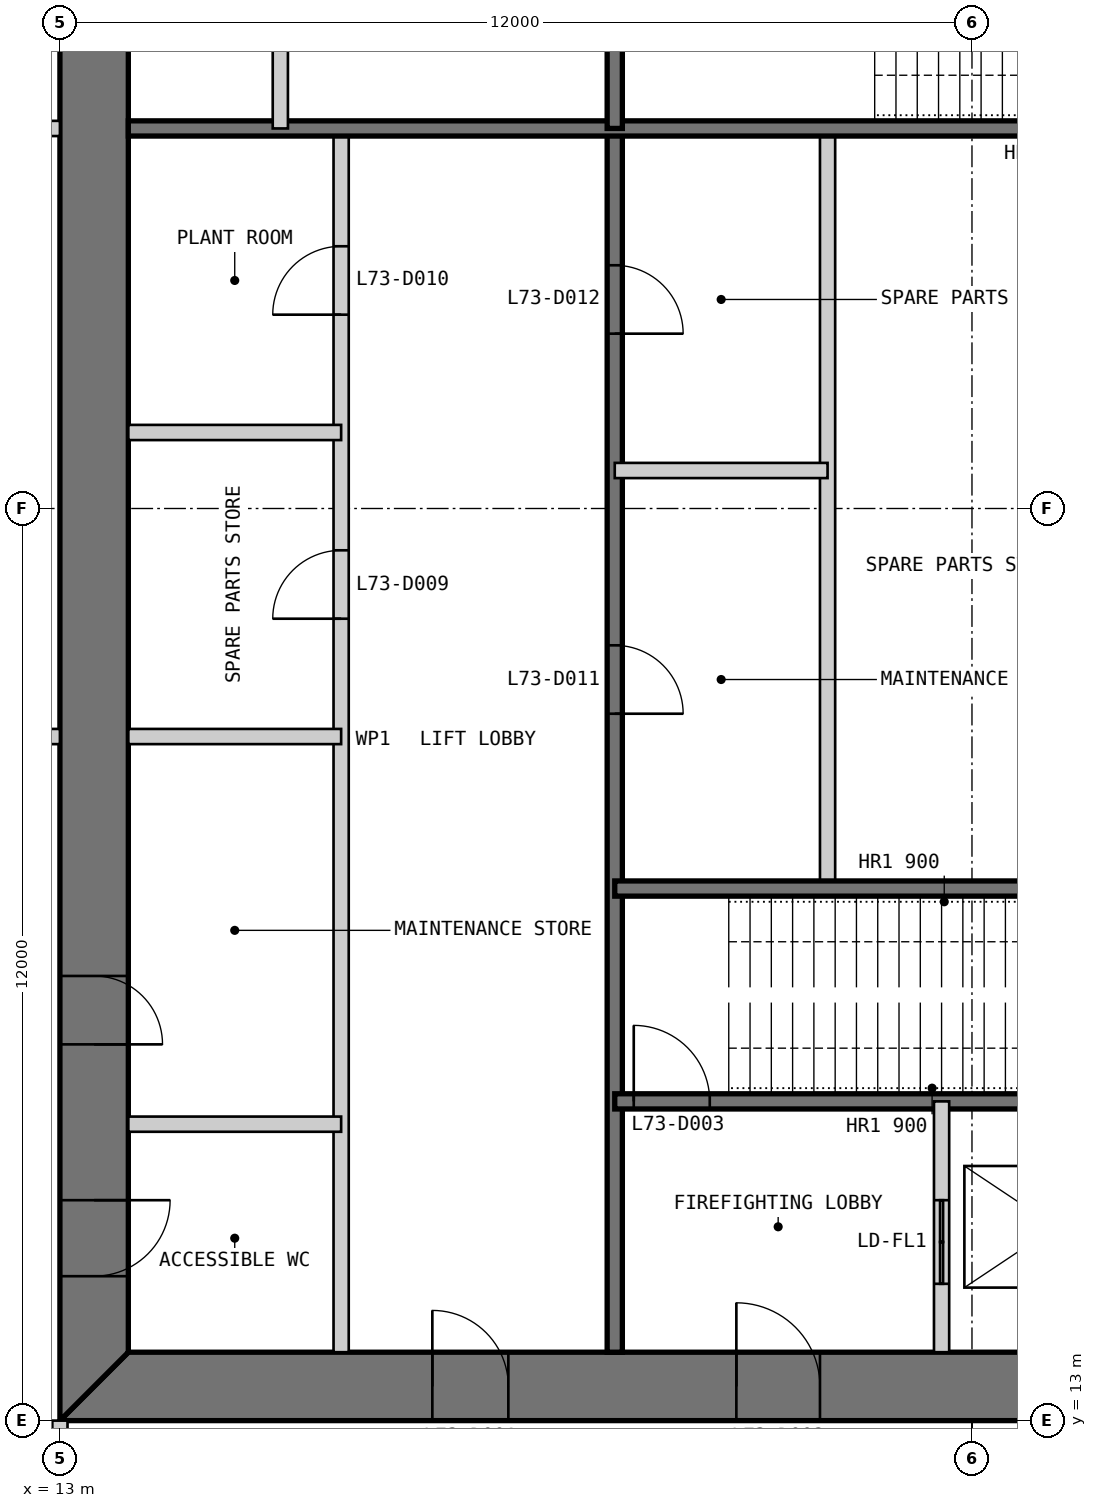
"""IFC4 building model, lengths in metres.
Left out: names, types, materials, properties, quantities, classifications, styles, units other than length and angle.
Written with IfcOpenShell. Run it as: python <this file> out.ifc"""

import sys

from ifc_helpers import new_model, si_unit, direction, frame, frame_2d, origin, place, context, subcontext, project, spatial, polyline, rectangle, outline, extrude, element, fill, save


model = new_model("IFC4")
c1 = context("Model", 3, precision=1e-05, world=origin(), true_north=direction((0.0, 1.0)))
c2 = subcontext(c1, "Body", "Model", "MODEL_VIEW")
j1 = project(units=[si_unit("LENGTHUNIT", "METRE"), si_unit("PLANEANGLEUNIT", "RADIAN")], contexts=[c1])
p1 = place(None, origin())
s1 = spatial("IfcSite", under=j1, at=p1, CompositionType="ELEMENT")
p2 = place(p1, origin())
s2 = spatial("IfcBuilding", under=s1, at=p2, CompositionType="ELEMENT")
p3 = place(p2, frame((0.0, 0.0, 301.8)))
s3 = spatial("IfcBuildingStorey", under=s2, at=p3, CompositionType="ELEMENT", Elevation=301.8)
p4 = place(p3, frame((13.0, 13.45, 0.0), z_axis=(0.0, 0.0, 1.0), x_axis=(1.0, 0.0, 0.0)))
e1 = element("IfcWall", 1, at=p4, inside=s3, PredefinedType="SHEAR", context=c2, shape_type="SweptSolid", body=[
    extrude(outline(polyline([(0.0, -0.45), (24.0, -0.45), (23.1, 0.45), (0.9, 0.45), (0.0, -0.45)])), origin(), (0.0, 0.0, 1.0), 6.0),
])
p5 = place(p4, frame((4.9, 0.0, 0.0)))
e2 = element("IfcOpeningElement", 2, at=p5, cuts=e1, PredefinedType="OPENING", context=c2, shape_type="SweptSolid", body=[
    extrude(rectangle(XDim=1.0, YDim=2.2, at=frame_2d((0.5, 1.1))), frame((0.0, 0.46, 0.0), z_axis=(0.0, -1.0, 0.0), x_axis=(1.0, 0.0, 0.0)), (0.0, 0.0, 1.0), 0.92),
])
p6 = place(p4, frame((8.9, 0.0, 0.0)))
e3 = element("IfcOpeningElement", 3, at=p6, cuts=e1, PredefinedType="OPENING", context=c2, shape_type="SweptSolid", body=[
    extrude(rectangle(XDim=1.1, YDim=2.2, at=frame_2d((0.55, 1.1))), frame((0.0, 0.46, 0.0), z_axis=(0.0, -1.0, 0.0), x_axis=(1.0, 0.0, 0.0)), (0.0, 0.0, 1.0), 0.92),
])
p7 = place(p4, frame((15.05, 0.0, 0.0)))
e4 = element("IfcOpeningElement", 4, at=p7, cuts=e1, PredefinedType="OPENING", context=c2, shape_type="SweptSolid", body=[
    extrude(rectangle(XDim=0.9, YDim=2.2, at=frame_2d((0.45, 1.1))), frame((0.0, 0.46, 0.0), z_axis=(0.0, -1.0, 0.0), x_axis=(1.0, 0.0, 0.0)), (0.0, 0.0, 1.0), 0.92),
])
p8 = place(p4, frame((17.9, 0.0, 0.0)))
e5 = element("IfcOpeningElement", 5, at=p8, cuts=e1, PredefinedType="OPENING", context=c2, shape_type="SweptSolid", body=[
    extrude(rectangle(XDim=1.0, YDim=2.2, at=frame_2d((0.5, 1.1))), frame((0.0, 0.46, 0.0), z_axis=(0.0, -1.0, 0.0), x_axis=(1.0, 0.0, 0.0)), (0.0, 0.0, 1.0), 0.92),
])
p9 = place(p4, frame((21.4, 0.0, 0.0)))
e6 = element("IfcOpeningElement", 6, at=p9, cuts=e1, PredefinedType="OPENING", context=c2, shape_type="SweptSolid", body=[
    extrude(rectangle(XDim=1.0, YDim=2.2, at=frame_2d((0.5, 1.1))), frame((0.0, 0.46, 0.0), z_axis=(0.0, -1.0, 0.0), x_axis=(1.0, 0.0, 0.0)), (0.0, 0.0, 1.0), 0.92),
])
p10 = place(p3, frame((13.45, 36.1, 0.0), z_axis=(0.0, 0.0, 1.0), x_axis=(0.0, -1.0, 0.0)))
e7 = element("IfcWall", 7, at=p10, inside=s3, PredefinedType="SHEAR", context=c2, shape_type="SweptSolid", body=[
    extrude(outline(polyline([(-0.9, -0.45), (23.1, -0.45), (22.2, 0.45), (0.0, 0.45), (-0.9, -0.45)])), origin(), (0.0, 0.0, 1.0), 6.0),
])
p11 = place(p10, frame((20.2, 0.0, 0.0)))
e8 = element("IfcOpeningElement", 8, at=p11, cuts=e7, PredefinedType="OPENING", context=c2, shape_type="SweptSolid", body=[
    extrude(rectangle(XDim=1.0, YDim=2.2, at=frame_2d((0.5, 1.1))), frame((0.0, 0.46, 0.0), z_axis=(0.0, -1.0, 0.0), x_axis=(1.0, 0.0, 0.0)), (0.0, 0.0, 1.0), 0.92),
])
p12 = place(p10, frame((17.25, 0.0, 0.0)))
e9 = element("IfcOpeningElement", 9, at=p12, cuts=e7, PredefinedType="OPENING", context=c2, shape_type="SweptSolid", body=[
    extrude(rectangle(XDim=0.9, YDim=2.2, at=frame_2d((0.45, 1.1))), frame((0.0, 0.46, 0.0), z_axis=(0.0, -1.0, 0.0), x_axis=(1.0, 0.0, 0.0)), (0.0, 0.0, 1.0), 0.92),
])
p13 = place(p3, frame((16.7, 13.9, 0.0), z_axis=(0.0, 0.0, 1.0), x_axis=(0.0, 1.0, 0.0)))
e10 = element("IfcWall", 10, at=p13, inside=s3, PredefinedType="PARTITIONING", context=c2, shape_type="SweptSolid", body=[
    extrude(rectangle(XDim=16.1, YDim=0.2, at=frame_2d((8.05, 0.0))), origin(), (0.0, 0.0, 1.0), 5.8),
])
p14 = place(p13, frame((9.65, 0.0, 0.0)))
e11 = element("IfcOpeningElement", 11, at=p14, cuts=e10, PredefinedType="OPENING", context=c2, shape_type="SweptSolid", body=[
    extrude(rectangle(XDim=0.9, YDim=2.2, at=frame_2d((0.45, 1.1))), frame((0.0, 0.11, 0.0), z_axis=(0.0, -1.0, 0.0), x_axis=(1.0, 0.0, 0.0)), (0.0, 0.0, 1.0), 0.22),
])
p15 = place(p13, frame((13.65, 0.0, 0.0)))
e12 = element("IfcOpeningElement", 12, at=p15, cuts=e10, PredefinedType="OPENING", context=c2, shape_type="SweptSolid", body=[
    extrude(rectangle(XDim=0.9, YDim=2.2, at=frame_2d((0.45, 1.1))), frame((0.0, 0.11, 0.0), z_axis=(0.0, -1.0, 0.0), x_axis=(1.0, 0.0, 0.0)), (0.0, 0.0, 1.0), 0.22),
])
p16 = place(p3, frame((20.3, 13.9, 0.0), z_axis=(0.0, 0.0, 1.0), x_axis=(0.0, 1.0, 0.0)))
e13 = element("IfcWall", 13, at=p16, inside=s3, PredefinedType="SOLIDWALL", context=c2, shape_type="SweptSolid", body=[
    extrude(rectangle(XDim=16.1, YDim=0.2, at=frame_2d((8.05, 0.0))), origin(), (0.0, 0.0, 1.0), 5.8),
])
p17 = place(p16, frame((8.4, 0.0, 0.0)))
e14 = element("IfcOpeningElement", 14, at=p17, cuts=e13, PredefinedType="OPENING", context=c2, shape_type="SweptSolid", body=[
    extrude(rectangle(XDim=0.9, YDim=2.2, at=frame_2d((0.45, 1.1))), frame((0.0, 0.11, 0.0), z_axis=(0.0, -1.0, 0.0), x_axis=(1.0, 0.0, 0.0)), (0.0, 0.0, 1.0), 0.22),
])
p18 = place(p16, frame((13.4, 0.0, 0.0)))
e15 = element("IfcOpeningElement", 15, at=p18, cuts=e13, PredefinedType="OPENING", context=c2, shape_type="SweptSolid", body=[
    extrude(rectangle(XDim=0.9, YDim=2.2, at=frame_2d((0.45, 1.1))), frame((0.0, 0.11, 0.0), z_axis=(0.0, -1.0, 0.0), x_axis=(1.0, 0.0, 0.0)), (0.0, 0.0, 1.0), 0.22),
])
p19 = place(p3, frame((23.1, 20.0, 0.0), z_axis=(0.0, 0.0, 1.0), x_axis=(0.0, 1.0, 0.0)))
e16 = element("IfcWall", 16, at=p19, inside=s3, PredefinedType="PARTITIONING", context=c2, shape_type="SweptSolid", body=[
    extrude(rectangle(XDim=10.0, YDim=0.2, at=frame_2d((5.0, 0.0))), origin(), (0.0, 0.0, 1.0), 5.8),
])
p20 = place(p3, frame((20.3, 17.2, 0.0), z_axis=(0.0, 0.0, 1.0), x_axis=(1.0, 0.0, 0.0)))
e17 = element("IfcWall", 17, at=p20, inside=s3, PredefinedType="SOLIDWALL", context=c2, shape_type="SweptSolid", body=[
    extrude(rectangle(XDim=9.4, YDim=0.2, at=frame_2d((4.7, 0.0))), origin(), (0.0, 0.0, 1.0), 5.8),
])
p21 = place(p20, frame((0.25, 0.0, 0.0)))
e18 = element("IfcOpeningElement", 18, at=p21, cuts=e17, PredefinedType="OPENING", context=c2, shape_type="SweptSolid", body=[
    extrude(rectangle(XDim=1.0, YDim=2.2, at=frame_2d((0.5, 1.1))), frame((0.0, 0.11, 0.0), z_axis=(0.0, -1.0, 0.0), x_axis=(1.0, 0.0, 0.0)), (0.0, 0.0, 1.0), 0.22),
])
p22 = place(p3, frame((20.3, 20.0, 0.0), z_axis=(0.0, 0.0, 1.0), x_axis=(1.0, 0.0, 0.0)))
e19 = element("IfcWall", 19, at=p22, inside=s3, PredefinedType="SOLIDWALL", context=c2, shape_type="SweptSolid", body=[
    extrude(rectangle(XDim=15.8, YDim=0.2, at=frame_2d((7.9, 0.0))), origin(), (0.0, 0.0, 1.0), 5.8),
])
p23 = place(p3, frame((24.6, 13.9, 0.0), z_axis=(0.0, 0.0, 1.0), x_axis=(0.0, 1.0, 0.0)))
e20 = element("IfcWall", 20, at=p23, inside=s3, PredefinedType="PARTITIONING", context=c2, shape_type="SweptSolid", body=[
    extrude(rectangle(XDim=3.3, YDim=0.2, at=frame_2d((1.65, 0.0))), origin(), (0.0, 0.0, 1.0), 5.8),
])
p24 = place(p23, frame((0.9, 0.0, 0.0)))
e21 = element("IfcOpeningElement", 21, at=p24, cuts=e20, PredefinedType="OPENING", context=c2, shape_type="SweptSolid", body=[
    extrude(rectangle(XDim=1.1, YDim=2.2, at=frame_2d((0.55, 1.1))), frame((0.0, 0.11, 0.0), z_axis=(0.0, -1.0, 0.0), x_axis=(1.0, 0.0, 0.0)), (0.0, 0.0, 1.0), 0.22),
])
for number, where, z_axis, x_axis in (
    (22, (13.9, 16.9, 0.0), (0.0, 0.0, 1.0), (1.0, 0.0, 0.0)),
    (23, (13.9, 22.0, 0.0), (0.0, 0.0, 1.0), (1.0, 0.0, 0.0)),
    (24, (13.9, 26.0, 0.0), (0.0, 0.0, 1.0), (1.0, 0.0, 0.0)),
    (25, (20.3, 25.5, 0.0), (0.0, 0.0, 1.0), (1.0, 0.0, 0.0)),
):
    element("IfcWall", number, at=place(p3, frame(where, z_axis=z_axis, x_axis=x_axis)), inside=s3, PredefinedType="PARTITIONING", context=c2, shape_type="SweptSolid", body=[
        extrude(rectangle(XDim=2.8, YDim=0.2, at=frame_2d((1.4, 0.0))), origin(), (0.0, 0.0, 1.0), 5.8),
    ])
p25 = place(p3, frame((29.7, 30.0, 0.0), z_axis=(0.0, 0.0, 1.0), x_axis=(-1.0, 0.0, 0.0)))
e26 = element("IfcWall", 26, at=p25, inside=s3, PredefinedType="SOLIDWALL", context=c2, shape_type="SweptSolid", body=[
    extrude(rectangle(XDim=15.8, YDim=0.2, at=frame_2d((7.9, 0.0))), origin(), (0.0, 0.0, 1.0), 5.8),
])
p26 = place(p3, frame((20.3, 36.1, 0.0), z_axis=(0.0, 0.0, 1.0), x_axis=(0.0, -1.0, 0.0)))
e27 = element("IfcWall", 27, at=p26, inside=s3, PredefinedType="SOLIDWALL", context=c2, shape_type="SweptSolid", body=[
    extrude(rectangle(XDim=6.1, YDim=0.2, at=frame_2d((3.05, 0.0))), origin(), (0.0, 0.0, 1.0), 5.8),
])
p27 = place(p3, frame((15.9, 36.1, 0.0), z_axis=(0.0, 0.0, 1.0), x_axis=(0.0, -1.0, 0.0)))
e28 = element("IfcWall", 28, at=p27, inside=s3, PredefinedType="PARTITIONING", context=c2, shape_type="SweptSolid", body=[
    extrude(rectangle(XDim=6.1, YDim=0.2, at=frame_2d((3.05, 0.0))), origin(), (0.0, 0.0, 1.0), 5.8),
])
p28 = place(p3, frame((13.0, 10.6, 0.0), z_axis=(0.0, 0.0, 1.0), x_axis=(0.0, 1.0, 0.0)))
e29 = element("IfcWall", 29, at=p28, inside=s3, PredefinedType="PARTITIONING", context=c2, shape_type="SweptSolid", body=[
    extrude(rectangle(XDim=2.4, YDim=0.2, at=frame_2d((1.2, 0.0))), origin(), (0.0, 0.0, 1.0), 4.853),
])
p29 = place(p3, frame((0.0, 22.0, 0.0), z_axis=(0.0, 0.0, 1.0), x_axis=(1.0, 0.0, 0.0)))
e30 = element("IfcWall", 30, at=p29, inside=s3, PredefinedType="PARTITIONING", context=c2, shape_type="SweptSolid", body=[
    extrude(rectangle(XDim=13.0, YDim=0.2, at=frame_2d((6.5, 0.0))), origin(), (0.0, 0.0, 1.0), 5.8),
])
p30 = place(p29, frame((5.6, 0.0, 0.0)))
e31 = element("IfcOpeningElement", 31, at=p30, cuts=e30, PredefinedType="OPENING", context=c2, shape_type="SweptSolid", body=[
    extrude(rectangle(XDim=1.8, YDim=2.4, at=frame_2d((0.9, 1.2))), frame((0.0, 0.11, 0.0), z_axis=(0.0, -1.0, 0.0), x_axis=(1.0, 0.0, 0.0)), (0.0, 0.0, 1.0), 0.22),
])
p31 = place(p3, frame((0.0, 30.0, 0.0), z_axis=(0.0, 0.0, 1.0), x_axis=(1.0, 0.0, 0.0)))
e32 = element("IfcWall", 32, at=p31, inside=s3, PredefinedType="PARTITIONING", context=c2, shape_type="SweptSolid", body=[
    extrude(rectangle(XDim=13.0, YDim=0.2, at=frame_2d((6.5, 0.0))), origin(), (0.0, 0.0, 1.0), 5.8),
])
p32 = place(p31, frame((5.6, 0.0, 0.0)))
e33 = element("IfcOpeningElement", 33, at=p32, cuts=e32, PredefinedType="OPENING", context=c2, shape_type="SweptSolid", body=[
    extrude(rectangle(XDim=1.8, YDim=2.4, at=frame_2d((0.9, 1.2))), frame((0.0, 0.11, 0.0), z_axis=(0.0, -1.0, 0.0), x_axis=(1.0, 0.0, 0.0)), (0.0, 0.0, 1.0), 0.22),
])
p33 = place(p5, origin())
e34 = element("IfcDoor", 34, at=p33, inside=s3, OperationType="SINGLE_SWING_LEFT", PredefinedType="DOOR", context=c2, shape_type="SweptSolid", body=[
    extrude(rectangle(XDim=1.0, YDim=2.2, at=frame_2d((0.5, 1.1))), frame((0.0, 0.025, 0.0), z_axis=(0.0, -1.0, 0.0), x_axis=(1.0, 0.0, 0.0)), (0.0, 0.0, 1.0), 0.05),
    extrude(outline(polyline([(0.0, 0.0), (0.04, 0.0), (0.04, 2.16), (0.96, 2.16), (0.96, 0.0), (1.0, 0.0), (1.0, 2.2), (0.0, 2.2), (0.0, 0.0)])), frame((0.0, 0.3, 0.0), z_axis=(0.0, -1.0, 0.0), x_axis=(1.0, 0.0, 0.0)), (0.0, 0.0, 1.0), 0.6),
])
fill(e2, e34)
p34 = place(p6, origin())
e35 = element("IfcDoor", 35, at=p34, inside=s3, OperationType="SINGLE_SWING_LEFT", PredefinedType="DOOR", context=c2, shape_type="SweptSolid", body=[
    extrude(rectangle(XDim=1.1, YDim=2.2, at=frame_2d((0.55, 1.1))), frame((0.0, 0.025, 0.0), z_axis=(0.0, -1.0, 0.0), x_axis=(1.0, 0.0, 0.0)), (0.0, 0.0, 1.0), 0.05),
    extrude(outline(polyline([(0.0, 0.0), (0.04, 0.0), (0.04, 2.16), (1.06, 2.16), (1.06, 0.0), (1.1, 0.0), (1.1, 2.2), (0.0, 2.2), (0.0, 0.0)])), frame((0.0, 0.3, 0.0), z_axis=(0.0, -1.0, 0.0), x_axis=(1.0, 0.0, 0.0)), (0.0, 0.0, 1.0), 0.6),
])
fill(e3, e35)
p35 = place(p21, origin())
e36 = element("IfcDoor", 36, at=p35, inside=s3, OperationType="SINGLE_SWING_LEFT", PredefinedType="DOOR", context=c2, shape_type="SweptSolid", body=[
    extrude(rectangle(XDim=1.0, YDim=2.2, at=frame_2d((0.5, 1.1))), frame((0.0, 0.025, 0.0), z_axis=(0.0, -1.0, 0.0), x_axis=(1.0, 0.0, 0.0)), (0.0, 0.0, 1.0), 0.05),
])
fill(e18, e36)
p36 = place(p11, origin())
e37 = element("IfcDoor", 37, at=p36, inside=s3, OperationType="SINGLE_SWING_LEFT", PredefinedType="DOOR", context=c2, shape_type="SweptSolid", body=[
    extrude(rectangle(XDim=1.0, YDim=2.2, at=frame_2d((0.5, 1.1))), frame((0.0, 0.025, 0.0), z_axis=(0.0, -1.0, 0.0), x_axis=(1.0, 0.0, 0.0)), (0.0, 0.0, 1.0), 0.05),
    extrude(outline(polyline([(0.0, 0.0), (0.04, 0.0), (0.04, 2.16), (0.96, 2.16), (0.96, 0.0), (1.0, 0.0), (1.0, 2.2), (0.0, 2.2), (0.0, 0.0)])), frame((0.0, 0.3, 0.0), z_axis=(0.0, -1.0, 0.0), x_axis=(1.0, 0.0, 0.0)), (0.0, 0.0, 1.0), 0.6),
])
fill(e8, e37)
p37 = place(p12, origin())
e38 = element("IfcDoor", 38, at=p37, inside=s3, OperationType="SINGLE_SWING_RIGHT", PredefinedType="DOOR", context=c2, shape_type="SweptSolid", body=[
    extrude(rectangle(XDim=0.9, YDim=2.2, at=frame_2d((0.45, 1.1))), frame((0.0, 0.025, 0.0), z_axis=(0.0, -1.0, 0.0), x_axis=(1.0, 0.0, 0.0)), (0.0, 0.0, 1.0), 0.05),
    extrude(outline(polyline([(0.0, 0.0), (0.04, 0.0), (0.04, 2.16), (0.86, 2.16), (0.86, 0.0), (0.9, 0.0), (0.9, 2.2), (0.0, 2.2), (0.0, 0.0)])), frame((0.0, 0.3, 0.0), z_axis=(0.0, -1.0, 0.0), x_axis=(1.0, 0.0, 0.0)), (0.0, 0.0, 1.0), 0.6),
])
fill(e9, e38)
p38 = place(p14, origin())
e39 = element("IfcDoor", 39, at=p38, inside=s3, OperationType="SINGLE_SWING_LEFT", PredefinedType="DOOR", context=c2, shape_type="SweptSolid", body=[
    extrude(rectangle(XDim=0.9, YDim=2.2, at=frame_2d((0.45, 1.1))), frame((0.0, 0.025, 0.0), z_axis=(0.0, -1.0, 0.0), x_axis=(1.0, 0.0, 0.0)), (0.0, 0.0, 1.0), 0.05),
])
fill(e11, e39)
p39 = place(p15, origin())
e40 = element("IfcDoor", 40, at=p39, inside=s3, OperationType="SINGLE_SWING_LEFT", PredefinedType="DOOR", context=c2, shape_type="SweptSolid", body=[
    extrude(rectangle(XDim=0.9, YDim=2.2, at=frame_2d((0.45, 1.1))), frame((0.0, 0.025, 0.0), z_axis=(0.0, -1.0, 0.0), x_axis=(1.0, 0.0, 0.0)), (0.0, 0.0, 1.0), 0.05),
])
fill(e12, e40)
p40 = place(p17, frame((0.9, 0.0, 0.0), z_axis=(0.0, 0.0, 1.0), x_axis=(-1.0, 0.0, 0.0)))
e41 = element("IfcDoor", 41, at=p40, inside=s3, OperationType="SINGLE_SWING_RIGHT", PredefinedType="DOOR", context=c2, shape_type="SweptSolid", body=[
    extrude(rectangle(XDim=0.9, YDim=2.2, at=frame_2d((0.45, 1.1))), frame((0.0, 0.025, 0.0), z_axis=(0.0, -1.0, 0.0), x_axis=(1.0, 0.0, 0.0)), (0.0, 0.0, 1.0), 0.05),
])
fill(e14, e41)
p41 = place(p18, frame((0.9, 0.0, 0.0), z_axis=(0.0, 0.0, 1.0), x_axis=(-1.0, 0.0, 0.0)))
e42 = element("IfcDoor", 42, at=p41, inside=s3, OperationType="SINGLE_SWING_RIGHT", PredefinedType="DOOR", context=c2, shape_type="SweptSolid", body=[
    extrude(rectangle(XDim=0.9, YDim=2.2, at=frame_2d((0.45, 1.1))), frame((0.0, 0.025, 0.0), z_axis=(0.0, -1.0, 0.0), x_axis=(1.0, 0.0, 0.0)), (0.0, 0.0, 1.0), 0.05),
])
fill(e15, e42)
p42 = place(p24, origin())
e43 = element("IfcDoor", 43, at=p42, inside=s3, OperationType="DOUBLE_DOOR_SLIDING", PredefinedType="DOOR", context=c2, shape_type="SweptSolid", body=[
    extrude(rectangle(XDim=1.1, YDim=2.2, at=frame_2d((0.55, 1.1))), frame((0.0, 0.025, 0.0), z_axis=(0.0, -1.0, 0.0), x_axis=(1.0, 0.0, 0.0)), (0.0, 0.0, 1.0), 0.05),
])
fill(e21, e43)
save(model, sys.argv[1])
